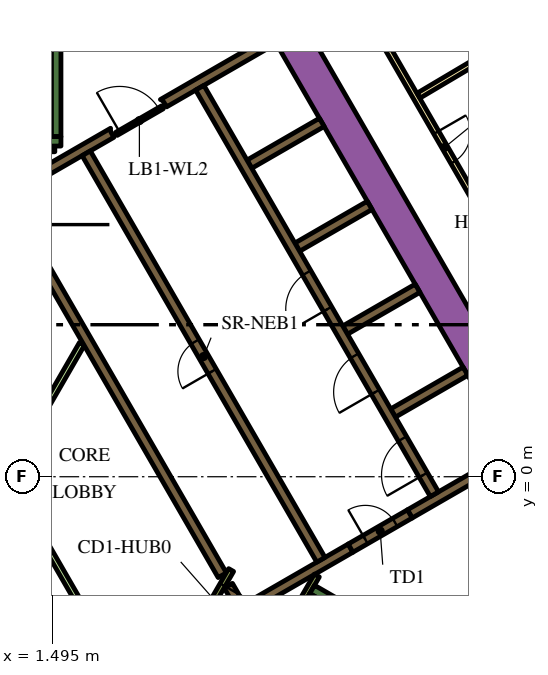
"""IFC4 building model, lengths in metres.
Left out: names, types, materials, properties, quantities, classifications, styles, units other than length and angle.
Written with IfcOpenShell. Run it as: python <this file> out.ifc"""

import sys

from ifc_helpers import new_model, si_unit, direction, frame, frame_2d, origin, place, context, subcontext, project, spatial, polyline, rectangle, outline, extrude, element, fill, save


model = new_model("IFC4")
c1 = context("Model", 3, precision=1e-05, world=origin(), true_north=direction((0.0, 1.0)))
c2 = subcontext(c1, "Body", "Model", "MODEL_VIEW")
j1 = project(units=[si_unit("LENGTHUNIT", "METRE"), si_unit("PLANEANGLEUNIT", "RADIAN")], contexts=[c1])
p1 = place(None, origin())
s1 = spatial("IfcSite", under=j1, at=p1, CompositionType="ELEMENT")
p2 = place(p1, origin())
s2 = spatial("IfcBuilding", under=s1, at=p2, CompositionType="ELEMENT")
p3 = place(p2, frame((0.0, 0.0, 114.9)))
s3 = spatial("IfcBuildingStorey", under=s2, at=p3, CompositionType="ELEMENT", Elevation=114.9)
p4 = place(p3, frame((6.776, 13.364, 0.0), z_axis=(0.0, 0.0, 1.0), x_axis=(0.500004177138, -0.8660229921, 0.0)))
e1 = element("IfcWall", 1, at=p4, inside=s3, PredefinedType="SOLIDWALL", context=c2, shape_type="SweptSolid", body=[
    extrude(rectangle(XDim=20.204, YDim=0.9, at=frame_2d((10.102, 0.0))), origin(), (0.0, 0.0, 1.0), 3.9),
])
p5 = place(p3, frame((8.334, -2.964, 0.0), z_axis=(0.0, 0.0, 1.0), x_axis=(0.866016039709, -0.500016218704, 0.0)))
e2 = element("IfcWall", 2, at=p5, inside=s3, PredefinedType="SOLIDWALL", context=c2, shape_type="SweptSolid", body=[
    extrude(rectangle(XDim=7.05, YDim=0.25, at=frame_2d((3.525, 0.0))), origin(), (0.0, 0.0, 1.0), 3.9),
])
p6 = place(p3, frame((8.168, -3.503, 0.0), z_axis=(0.0, 0.0, 1.0), x_axis=(0.49972245349, 0.866185586049, 0.0)))
e3 = element("IfcWall", 3, at=p6, inside=s3, PredefinedType="SOLIDWALL", context=c2, shape_type="SweptSolid", body=[
    extrude(rectangle(XDim=0.425, YDim=0.25, at=frame_2d((0.212, 0.0))), origin(), (0.0, 0.0, 1.0), 3.9),
])
p7 = place(p3, frame((1.6, 8.95, 0.0), z_axis=(0.0, 0.0, 1.0), x_axis=(0.0, 1.0, 0.0)))
e4 = element("IfcWall", 4, at=p7, inside=s3, PredefinedType="SOLIDWALL", context=c2, shape_type="SweptSolid", body=[
    extrude(rectangle(XDim=6.8, YDim=0.25, at=frame_2d((3.4, 0.0))), origin(), (0.0, 0.0, 1.0), 3.9),
])
p8 = place(p3, frame((1.05, 8.825, 0.0), z_axis=(0.0, 0.0, 1.0), x_axis=(1.0, 0.0, 0.0)))
e5 = element("IfcWall", 5, at=p8, inside=s3, PredefinedType="SOLIDWALL", context=c2, shape_type="SweptSolid", body=[
    extrude(rectangle(XDim=0.675, YDim=0.25, at=frame_2d((0.337, 0.0))), origin(), (0.0, 0.0, 1.0), 3.9),
])
p9 = place(p3, frame((10.464, 1.677, 0.0), z_axis=(0.0, 0.0, 1.0), x_axis=(0.86605622881, 0.499946605688, 0.0)))
e6 = element("IfcWall", 6, at=p9, inside=s3, PredefinedType="SOLIDWALL", context=c2, shape_type="SweptSolid", body=[
    extrude(rectangle(XDim=2.2, YDim=0.25, at=frame_2d((1.1, 0.0))), origin(), (0.0, 0.0, 1.0), 3.9),
])
p10 = place(p3, frame((13.629, 0.594, 0.0), z_axis=(0.0, 0.0, 1.0), x_axis=(-0.86602790099, -0.499995674689, 0.0)))
e7 = element("IfcWall", 7, at=p10, inside=s3, PredefinedType="SOLIDWALL", context=c2, shape_type="SweptSolid", body=[
    extrude(rectangle(XDim=3.146, YDim=0.25, at=frame_2d((1.573, 0.0))), origin(), (0.0, 0.0, 1.0), 3.9),
])
p11 = place(p3, frame((9.346, -1.879, 0.0), z_axis=(0.0, 0.0, 1.0), x_axis=(-0.866048528039, -0.499959945477, 0.0)))
e8 = element("IfcWall", 8, at=p11, inside=s3, PredefinedType="SOLIDWALL", context=c2, shape_type="SweptSolid", body=[
    extrude(rectangle(XDim=3.47, YDim=0.25, at=frame_2d((1.735, 0.0))), origin(), (0.0, 0.0, 1.0), 3.9),
])
p12 = place(p3, frame((6.13, -2.867, 0.0), z_axis=(0.0, 0.0, 1.0), x_axis=(0.500160776593, -0.865932559475, 0.0)))
e9 = element("IfcWall", 9, at=p12, inside=s3, PredefinedType="SOLIDWALL", context=c2, shape_type="SweptSolid", body=[
    extrude(rectangle(XDim=0.627, YDim=0.25, at=frame_2d((0.313, 0.0))), origin(), (0.0, 0.0, 1.0), 3.9),
])
for number, where, z_axis, x_axis in (
    (10, (9.204, 3.859, 0.0), (0.0, 0.0, 1.0), (0.866, 0.5, 0.0)),
    (11, (7.944, 6.041, 0.0), (0.0, 0.0, 1.0), (0.866, 0.5, 0.0)),
    (12, (6.684, 8.224, 0.0), (0.0, 0.0, 1.0), (0.866, 0.5, 0.0)),
):
    element("IfcWall", number, at=place(p3, frame(where, z_axis=z_axis, x_axis=x_axis)), inside=s3, PredefinedType="SOLIDWALL", context=c2, shape_type="SweptSolid", body=[
        extrude(rectangle(XDim=2.2, YDim=0.25, at=frame_2d((1.1, 0.0))), origin(), (0.0, 0.0, 1.0), 3.9),
    ])
p13 = place(p3, origin())
e13 = element("IfcWall", 13, at=p13, inside=s3, PredefinedType="SOLIDWALL", context=c2, shape_type="SweptSolid", body=[
    extrude(outline(polyline([(2.776, 8.733), (2.499, 8.573), (2.498, 8.573), (2.498, 8.573), (2.282, 8.448), (2.282, 8.448), (0.377, 7.348), (0.16, 7.223), (0.035, 7.439), (3.032, 9.169), (3.03, 9.152), (3.03, 9.133), (3.031, 9.113), (3.035, 9.094), (3.04, 9.075), (3.047, 9.057), (3.056, 9.039), (3.119, 8.931), (2.776, 8.733)])), origin(), (0.0, 0.0, 1.0), 3.9),
])
e14 = element("IfcWall", 14, at=p13, inside=s3, PredefinedType="SOLIDWALL", context=c2, shape_type="SweptSolid", body=[
    extrude(outline(polyline([(5.27, 10.173), (5.27, 10.173), (4.683, 9.834), (4.504, 9.731), (4.442, 9.839), (4.431, 9.856), (4.419, 9.871), (4.406, 9.885), (4.39, 9.898), (4.374, 9.909), (4.357, 9.918), (4.341, 9.925), (7.266, 11.614), (7.391, 11.398), (5.486, 10.298), (5.486, 10.298), (5.27, 10.173), (5.27, 10.173)])), origin(), (0.0, 0.0, 1.0), 3.9),
])
p14 = place(p3, frame((5.97, -2.591, 0.0), z_axis=(0.0, 0.0, 1.0), x_axis=(-0.499994469932, 0.866028596547, 0.0)))
e15 = element("IfcWall", 15, at=p14, inside=s3, PredefinedType="SOLIDWALL", context=c2, shape_type="SweptSolid", body=[
    extrude(rectangle(XDim=10.488, YDim=0.25, at=frame_2d((5.244, 0.0))), origin(), (0.0, 0.0, 1.0), 3.9),
])
p15 = place(p3, frame((8.459, -2.599, 0.0), z_axis=(0.0, 0.0, 1.0), x_axis=(-0.500041054325, -0.866001699761, 0.0)))
e16 = element("IfcWall", 16, at=p15, inside=s3, PredefinedType="PARTITIONING", context=c2, shape_type="SweptSolid", body=[
    extrude(rectangle(XDim=0.929, YDim=0.15, at=frame_2d((0.464, 0.0))), origin(), (0.0, 0.0, 1.0), 3.9),
])
p16 = place(p3, frame((2.435, -3.718, 0.0), z_axis=(0.0, 0.0, 1.0), x_axis=(-0.499985176046, 0.866033962229, 0.0)))
e17 = element("IfcWall", 17, at=p16, inside=s3, PredefinedType="PARTITIONING", context=c2, shape_type="SweptSolid", body=[
    extrude(rectangle(XDim=8.875, YDim=0.15, at=frame_2d((4.438, 0.0))), origin(), (0.0, 0.0, 1.0), 2.75),
])
p17 = place(p3, frame((0.336, 0.132, 0.0), z_axis=(0.0, 0.0, 1.0), x_axis=(0.500001957507, 0.866024273614, 0.0)))
e18 = element("IfcWall", 18, at=p17, inside=s3, PredefinedType="PARTITIONING", context=c2, shape_type="SweptSolid", body=[
    extrude(rectangle(XDim=3.881, YDim=0.15, at=frame_2d((1.941, 0.0))), origin(), (0.0, 0.0, 1.0), 2.75),
])
p18 = place(p3, frame((1.05, 8.625, 0.0), z_axis=(0.0, 0.0, 1.0), x_axis=(1.0, 0.0, 0.0)))
e19 = element("IfcWall", 19, at=p18, inside=s3, PredefinedType="PARTITIONING", context=c2, shape_type="SweptSolid", body=[
    extrude(rectangle(XDim=0.514, YDim=0.15, at=frame_2d((0.257, 0.0))), origin(), (0.0, 0.0, 1.0), 2.75),
])
p19 = place(p3, frame((11.553, -0.46, 0.0), z_axis=(0.0, 0.0, 1.0), x_axis=(-0.500006514828, 0.866021642414, 0.0)))
e20 = element("IfcWall", 20, at=p19, inside=s3, PredefinedType="SOLIDWALL", context=c2, shape_type="SweptSolid", body=[
    extrude(rectangle(XDim=12.35, YDim=0.25, at=frame_2d((6.175, 0.0))), origin(), (0.0, 0.0, 1.0), 3.9),
])
p20 = place(p19, frame((0.585, 0.0, 0.0)))
e21 = element("IfcOpeningElement", 21, at=p20, cuts=e20, PredefinedType="OPENING", context=c2, shape_type="SweptSolid", body=[
    extrude(rectangle(XDim=1.1, YDim=2.1, at=frame_2d((0.55, 1.05))), frame((0.0, 0.135, 0.0), z_axis=(0.0, -1.0, 0.0), x_axis=(1.0, 0.0, 0.0)), (0.0, 0.0, 1.0), 0.27),
])
p21 = place(p19, frame((3.105, 0.0, 0.0)))
e22 = element("IfcOpeningElement", 22, at=p21, cuts=e20, PredefinedType="OPENING", context=c2, shape_type="SweptSolid", body=[
    extrude(rectangle(XDim=1.1, YDim=2.1, at=frame_2d((0.55, 1.05))), frame((0.0, 0.135, 0.0), z_axis=(0.0, -1.0, 0.0), x_axis=(1.0, 0.0, 0.0)), (0.0, 0.0, 1.0), 0.27),
])
p22 = place(p19, frame((5.625, 0.0, 0.0)))
e23 = element("IfcOpeningElement", 23, at=p22, cuts=e20, PredefinedType="OPENING", context=c2, shape_type="SweptSolid", body=[
    extrude(rectangle(XDim=1.1, YDim=2.1, at=frame_2d((0.55, 1.05))), frame((0.0, 0.135, 0.0), z_axis=(0.0, -1.0, 0.0), x_axis=(1.0, 0.0, 0.0)), (0.0, 0.0, 1.0), 0.27),
])
p23 = place(p3, frame((8.565, -2.185, 0.0), z_axis=(0.0, 0.0, 1.0), x_axis=(-0.499997954832, 0.866026584559, 0.0)))
e24 = element("IfcWall", 24, at=p23, inside=s3, PredefinedType="SOLIDWALL", context=c2, shape_type="SweptSolid", body=[
    extrude(rectangle(XDim=12.35, YDim=0.25, at=frame_2d((6.175, 0.0))), origin(), (0.0, 0.0, 1.0), 3.9),
])
p24 = place(p23, frame((5.725, 0.0, 0.0)))
e25 = element("IfcOpeningElement", 25, at=p24, cuts=e24, PredefinedType="OPENING", context=c2, shape_type="SweptSolid", body=[
    extrude(rectangle(XDim=0.9, YDim=2.1, at=frame_2d((0.45, 1.05))), frame((0.0, 0.135, 0.0), z_axis=(0.0, -1.0, 0.0), x_axis=(1.0, 0.0, 0.0)), (0.0, 0.0, 1.0), 0.27),
])
p25 = place(p3, frame((9.346, -1.879, 0.0), z_axis=(0.0, 0.0, 1.0), x_axis=(0.866047807691, 0.499961193289, 0.0)))
e26 = element("IfcWall", 26, at=p25, inside=s3, PredefinedType="SOLIDWALL", context=c2, shape_type="SweptSolid", body=[
    extrude(rectangle(XDim=1.8, YDim=0.25, at=frame_2d((0.9, 0.0))), origin(), (0.0, 0.0, 1.0), 3.9),
])
p26 = place(p25, frame((0.45, 0.0, 0.0)))
e27 = element("IfcOpeningElement", 27, at=p26, cuts=e26, PredefinedType="OPENING", context=c2, shape_type="SweptSolid", body=[
    extrude(rectangle(XDim=0.9, YDim=2.1, at=frame_2d((0.45, 1.05))), frame((0.0, 0.135, 0.0), z_axis=(0.0, -1.0, 0.0), x_axis=(1.0, 0.0, 0.0)), (0.0, 0.0, 1.0), 0.27),
])
p27 = place(p3, frame((6.203, -2.456, 0.0), z_axis=(0.0, 0.0, 1.0), x_axis=(-0.500043961785, -0.866000020948, 0.0)))
e28 = element("IfcWall", 28, at=p27, inside=s3, PredefinedType="PARTITIONING", context=c2, shape_type="SweptSolid", body=[
    extrude(rectangle(XDim=1.95, YDim=0.15, at=frame_2d((0.975, 0.0))), origin(), (0.0, 0.0, 1.0), 3.9),
])
p28 = place(p27, frame((0.45, 0.0, 0.0)))
e29 = element("IfcOpeningElement", 29, at=p28, cuts=e28, PredefinedType="OPENING", context=c2, shape_type="SweptSolid", body=[
    extrude(rectangle(XDim=0.9, YDim=2.1, at=frame_2d((0.45, 1.05))), frame((0.0, 0.085, 0.0), z_axis=(0.0, -1.0, 0.0), x_axis=(1.0, 0.0, 0.0)), (0.0, 0.0, 1.0), 0.17),
])
p29 = place(p3, frame((3.183, 9.02, 0.0), z_axis=(0.0, 0.0, 1.0), x_axis=(0.866034573852, 0.49998411664, 0.0)))
e30 = element("IfcWall", 30, at=p29, inside=s3, PredefinedType="PARTITIONING", context=c2, shape_type="SweptSolid", body=[
    extrude(rectangle(XDim=1.4, YDim=0.09, at=frame_2d((0.7, 0.0))), origin(), (0.0, 0.0, 1.0), 2.75),
])
p30 = place(p29, frame((0.1, 0.0, 0.0)))
e31 = element("IfcOpeningElement", 31, at=p30, cuts=e30, PredefinedType="OPENING", context=c2, shape_type="SweptSolid", body=[
    extrude(rectangle(XDim=1.2, YDim=2.1, at=frame_2d((0.6, 1.05))), frame((0.0, 0.055, 0.0), z_axis=(0.0, -1.0, 0.0), x_axis=(1.0, 0.0, 0.0)), (0.0, 0.0, 1.0), 0.11),
])
p31 = place(p3, frame((6.163, 18.475, 0.0), z_axis=(0.0, 0.0, 1.0), x_axis=(0.500001317485, -0.866024643133, 0.0)))
e32 = element("IfcWall", 32, at=p31, inside=s3, PredefinedType="PARTITIONING", context=c2, shape_type="SweptSolid", body=[
    extrude(rectangle(XDim=25.767, YDim=0.15, at=frame_2d((12.883, 0.0))), origin(), (0.0, 0.0, 1.0), 2.75),
])
p32 = place(p31, frame((24.241, 0.0, 0.0)))
e33 = element("IfcOpeningElement", 33, at=p32, cuts=e32, PredefinedType="OPENING", context=c2, shape_type="SweptSolid", body=[
    extrude(rectangle(XDim=1.0, YDim=2.1, at=frame_2d((0.5, 1.05))), frame((0.0, 0.085, 0.0), z_axis=(0.0, -1.0, 0.0), x_axis=(1.0, 0.0, 0.0)), (0.0, 0.0, 1.0), 0.17),
])
p33 = place(p31, frame((13.144, 0.0, 0.0)))
e34 = element("IfcOpeningElement", 34, at=p33, cuts=e32, PredefinedType="OPENING", context=c2, shape_type="SweptSolid", body=[
    extrude(rectangle(XDim=1.0, YDim=2.1, at=frame_2d((0.5, 1.05))), frame((0.0, 0.085, 0.0), z_axis=(0.0, -1.0, 0.0), x_axis=(1.0, 0.0, 0.0)), (0.0, 0.0, 1.0), 0.17),
])
p34 = place(p31, frame((10.874, 0.0, 0.0)))
e35 = element("IfcOpeningElement", 35, at=p34, cuts=e32, PredefinedType="OPENING", context=c2, shape_type="SweptSolid", body=[
    extrude(rectangle(XDim=0.9, YDim=2.1, at=frame_2d((0.45, 1.05))), frame((0.0, 0.085, 0.0), z_axis=(0.0, -1.0, 0.0), x_axis=(1.0, 0.0, 0.0)), (0.0, 0.0, 1.0), 0.17),
])
p35 = place(p31, frame((3.718, 0.0, 0.0)))
e36 = element("IfcOpeningElement", 36, at=p35, cuts=e32, PredefinedType="OPENING", context=c2, shape_type="SweptSolid", body=[
    extrude(rectangle(XDim=1.0, YDim=2.1, at=frame_2d((0.5, 1.05))), frame((0.0, 0.085, 0.0), z_axis=(0.0, -1.0, 0.0), x_axis=(1.0, 0.0, 0.0)), (0.0, 0.0, 1.0), 0.17),
])
p36 = place(p31, frame((2.411, 0.0, 0.0)))
e37 = element("IfcOpeningElement", 37, at=p36, cuts=e32, PredefinedType="OPENING", context=c2, shape_type="SweptSolid", body=[
    extrude(rectangle(XDim=1.0, YDim=2.1, at=frame_2d((0.5, 1.05))), frame((0.0, 0.085, 0.0), z_axis=(0.0, -1.0, 0.0), x_axis=(1.0, 0.0, 0.0)), (0.0, 0.0, 1.0), 0.17),
])
p37 = place(p3, frame((17.379, 13.731, 0.0), z_axis=(0.0, 0.0, 1.0), x_axis=(-0.860132461691, -0.510070728768, 0.0)))
e38 = element("IfcWall", 38, at=p37, inside=s3, PredefinedType="PARTITIONING", context=c2, shape_type="SweptSolid", body=[
    extrude(rectangle(XDim=7.257, YDim=0.15, at=frame_2d((3.628, 0.0))), origin(), (0.0, 0.0, 1.0), 2.75),
])
p38 = place(p20, origin())
e39 = element("IfcDoor", 39, at=p38, inside=s3, OperationType="DOUBLE_DOOR_SLIDING", PredefinedType="DOOR", context=c2, shape_type="SweptSolid", body=[
    extrude(rectangle(XDim=1.1, YDim=2.1, at=frame_2d((0.55, 1.05))), frame((0.0, 0.025, 0.0), z_axis=(0.0, -1.0, 0.0), x_axis=(1.0, 0.0, 0.0)), (0.0, 0.0, 1.0), 0.05),
])
fill(e21, e39)
p39 = place(p21, origin())
e40 = element("IfcDoor", 40, at=p39, inside=s3, OperationType="DOUBLE_DOOR_SLIDING", PredefinedType="DOOR", context=c2, shape_type="SweptSolid", body=[
    extrude(rectangle(XDim=1.1, YDim=2.1, at=frame_2d((0.55, 1.05))), frame((0.0, 0.025, 0.0), z_axis=(0.0, -1.0, 0.0), x_axis=(1.0, 0.0, 0.0)), (0.0, 0.0, 1.0), 0.05),
])
fill(e22, e40)
p40 = place(p22, origin())
e41 = element("IfcDoor", 41, at=p40, inside=s3, OperationType="DOUBLE_DOOR_SLIDING", PredefinedType="DOOR", context=c2, shape_type="SweptSolid", body=[
    extrude(rectangle(XDim=1.1, YDim=2.1, at=frame_2d((0.55, 1.05))), frame((0.0, 0.025, 0.0), z_axis=(0.0, -1.0, 0.0), x_axis=(1.0, 0.0, 0.0)), (0.0, 0.0, 1.0), 0.05),
])
fill(e23, e41)
p41 = place(p24, origin())
e42 = element("IfcDoor", 42, at=p41, inside=s3, OperationType="SINGLE_SWING_LEFT", PredefinedType="DOOR", context=c2, shape_type="SweptSolid", body=[
    extrude(rectangle(XDim=0.9, YDim=2.1, at=frame_2d((0.45, 1.05))), frame((0.0, 0.025, 0.0), z_axis=(0.0, -1.0, 0.0), x_axis=(1.0, 0.0, 0.0)), (0.0, 0.0, 1.0), 0.05),
])
fill(e25, e42)
p42 = place(p26, origin())
e43 = element("IfcDoor", 43, at=p42, inside=s3, OperationType="SINGLE_SWING_LEFT", PredefinedType="DOOR", context=c2, shape_type="SweptSolid", body=[
    extrude(rectangle(XDim=0.9, YDim=2.1, at=frame_2d((0.45, 1.05))), frame((0.0, 0.025, 0.0), z_axis=(0.0, -1.0, 0.0), x_axis=(1.0, 0.0, 0.0)), (0.0, 0.0, 1.0), 0.05),
])
fill(e27, e43)
p43 = place(p28, origin())
e44 = element("IfcDoor", 44, at=p43, inside=s3, OperationType="SINGLE_SWING_LEFT", PredefinedType="DOOR", context=c2, shape_type="SweptSolid", body=[
    extrude(rectangle(XDim=0.9, YDim=2.1, at=frame_2d((0.45, 1.05))), frame((0.0, 0.025, 0.0), z_axis=(0.0, -1.0, 0.0), x_axis=(1.0, 0.0, 0.0)), (0.0, 0.0, 1.0), 0.05),
])
fill(e29, e44)
p44 = place(p30, origin())
e45 = element("IfcDoor", 45, at=p44, inside=s3, OperationType="SINGLE_SWING_LEFT", PredefinedType="DOOR", context=c2, shape_type="SweptSolid", body=[
    extrude(rectangle(XDim=1.2, YDim=2.1, at=frame_2d((0.6, 1.05))), frame((0.0, 0.025, 0.0), z_axis=(0.0, -1.0, 0.0), x_axis=(1.0, 0.0, 0.0)), (0.0, 0.0, 1.0), 0.05),
])
fill(e31, e45)
p45 = place(p34, origin())
e46 = element("IfcDoor", 46, at=p45, inside=s3, OperationType="SINGLE_SWING_RIGHT", PredefinedType="DOOR", context=c2, shape_type="SweptSolid", body=[
    extrude(rectangle(XDim=0.9, YDim=2.1, at=frame_2d((0.45, 1.05))), frame((0.0, 0.025, 0.0), z_axis=(0.0, -1.0, 0.0), x_axis=(1.0, 0.0, 0.0)), (0.0, 0.0, 1.0), 0.05),
])
fill(e35, e46)
save(model, sys.argv[1])
